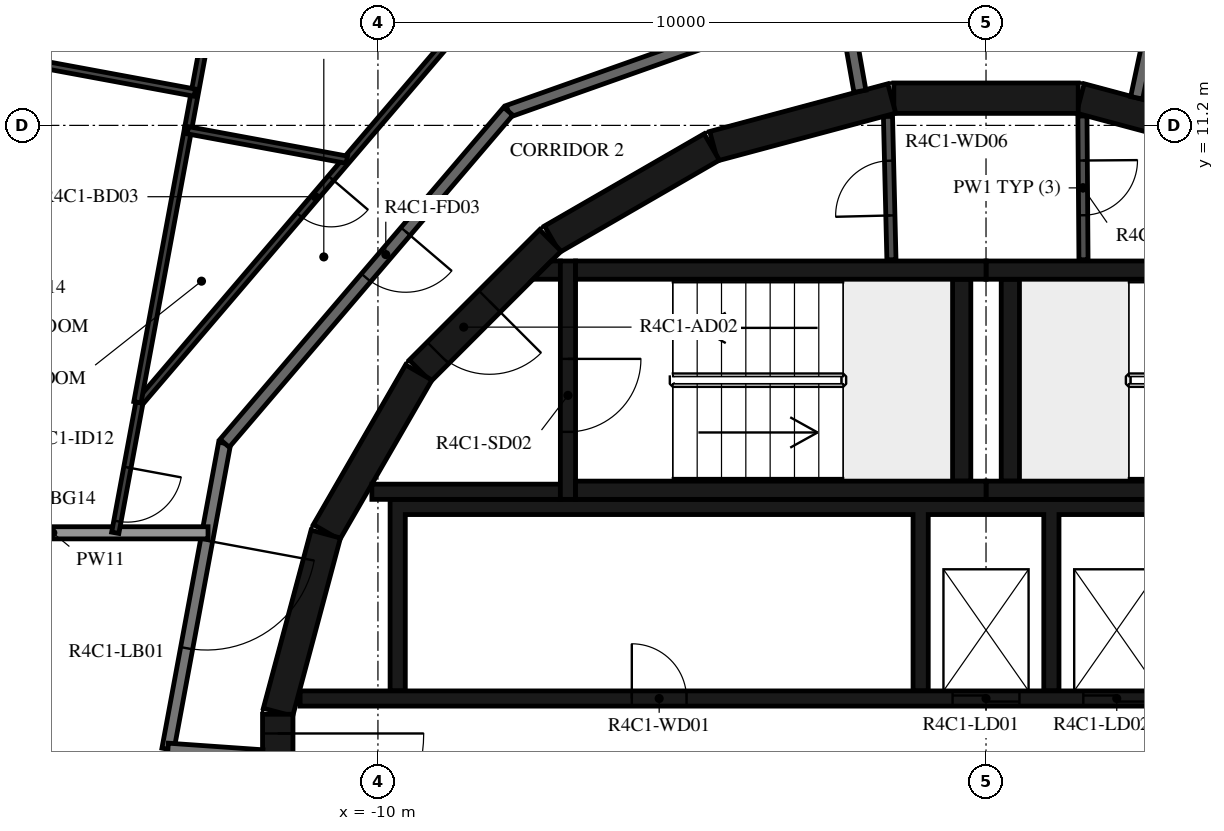
"""IFC4 building model, lengths in metres.
Left out: names, types, materials, properties, quantities, classifications, styles, units other than length and angle.
Written with IfcOpenShell. Run it as: python <this file> out.ifc"""

import sys

from ifc_helpers import new_model, si_unit, direction, frame, frame_2d, origin, place, context, subcontext, project, spatial, polyline, rectangle, outline, extrude, element, fill, save


model = new_model("IFC4")
c1 = context("Model", 3, precision=1e-05, world=origin(), true_north=direction((0.0, 1.0)))
c2 = subcontext(c1, "Body", "Model", "MODEL_VIEW")
j1 = project(units=[si_unit("LENGTHUNIT", "METRE"), si_unit("PLANEANGLEUNIT", "RADIAN")], contexts=[c1])
p1 = place(None, origin())
s1 = spatial("IfcSite", under=j1, at=p1, CompositionType="ELEMENT")
p2 = place(p1, origin())
s2 = spatial("IfcBuilding", under=s1, at=p2, CompositionType="ELEMENT")
p3 = place(p2, frame((0.0, 0.0, 176.2)))
s3 = spatial("IfcBuildingStorey", under=s2, at=p3, CompositionType="ELEMENT", Elevation=176.2)
for number, where, z_axis, x_axis in (
    (1, (4.479, 10.858, 0.0), (0.0, 0.0, 1.0), (-0.966, 0.259, 0.0)),
    (2, (1.516, 11.647, 0.0), (0.0, 0.0, 1.0), (-1.0, 0.0, 0.0)),
    (3, (-1.55, 11.643, 0.0), (0.0, 0.0, 1.0), (-0.966, -0.259, 0.0)),
    (4, (-4.51, 10.845, 0.0), (0.0, 0.0, 1.0), (-0.866, -0.5, 0.0)),
):
    element("IfcWall", number, at=place(p3, frame(where, z_axis=z_axis, x_axis=x_axis)), inside=s3, PredefinedType="SHEAR", context=c2, shape_type="SweptSolid", body=[
        extrude(rectangle(XDim=3.033, YDim=0.5, at=frame_2d((1.516, 0.0))), origin(), (0.0, 0.0, 1.0), 3.12),
    ])
p4 = place(p3, frame((-7.164, 9.308, 0.0), z_axis=(0.0, 0.0, 1.0), x_axis=(-0.707106781187, -0.707106781187, 0.0)))
e5 = element("IfcWall", 5, at=p4, inside=s3, PredefinedType="SHEAR", context=c2, shape_type="SweptSolid", body=[
    extrude(rectangle(XDim=3.032, YDim=0.5, at=frame_2d((1.516, 0.0))), origin(), (0.0, 0.0, 1.0), 3.12),
])
p5 = place(p4, frame((1.416, 0.0, 0.0)))
e6 = element("IfcOpeningElement", 6, at=p5, cuts=e5, PredefinedType="OPENING", context=c2, shape_type="SweptSolid", body=[
    extrude(rectangle(XDim=1.2, YDim=2.1, at=frame_2d((0.6, 1.05))), frame((0.0, 0.26, 0.0), z_axis=(0.0, -1.0, 0.0), x_axis=(1.0, 0.0, 0.0)), (0.0, 0.0, 1.0), 0.52),
])
for number, where, z_axis, x_axis in (
    (7, (-9.329, 7.137, 0.0), (0.0, 0.0, 1.0), (-0.5, -0.866, 0.0)),
    (8, (-10.858, 4.479, 0.0), (0.0, 0.0, 1.0), (-0.259, -0.966, 0.0)),
):
    element("IfcWall", number, at=place(p3, frame(where, z_axis=z_axis, x_axis=x_axis)), inside=s3, PredefinedType="SHEAR", context=c2, shape_type="SweptSolid", body=[
        extrude(rectangle(XDim=3.033, YDim=0.5, at=frame_2d((1.516, 0.0))), origin(), (0.0, 0.0, 1.0), 3.12),
    ])
p6 = place(p3, frame((-11.647, 1.516, 0.0), z_axis=(0.0, 0.0, 1.0), x_axis=(0.0, -1.0, 0.0)))
e9 = element("IfcWall", 9, at=p6, inside=s3, PredefinedType="SHEAR", context=c2, shape_type="SweptSolid", body=[
    extrude(rectangle(XDim=3.033, YDim=0.5, at=frame_2d((1.516, 0.0))), origin(), (0.0, 0.0, 1.0), 3.12),
])
p7 = place(p6, frame((0.316, 0.0, 0.0)))
e10 = element("IfcOpeningElement", 10, at=p7, cuts=e9, PredefinedType="OPENING", context=c2, shape_type="SweptSolid", body=[
    extrude(rectangle(XDim=2.4, YDim=2.1, at=frame_2d((1.2, 1.05))), frame((0.0, 0.26, 0.0), z_axis=(0.0, -1.0, 0.0), x_axis=(1.0, 0.0, 0.0)), (0.0, 0.0, 1.0), 0.52),
])
for number, where, z_axis, x_axis in (
    (11, (0.0, 5.2, 0.0), (0.0, 0.0, 1.0), (1.0, 0.0, 0.0)),
    (12, (0.0, 8.82, 0.0), (0.0, 0.0, 1.0), (1.0, 0.0, 0.0)),
):
    element("IfcWall", number, at=place(p3, frame(where, z_axis=z_axis, x_axis=x_axis)), inside=s3, PredefinedType="SHEAR", context=c2, shape_type="SweptSolid", body=[
        extrude(rectangle(XDim=6.75, YDim=0.3, at=frame_2d((3.375, 0.0))), origin(), (0.0, 0.0, 1.0), 3.12),
    ])
p8 = place(p3, frame((0.4, 5.35, 0.0), z_axis=(0.0, 0.0, 1.0), x_axis=(0.0, 1.0, 0.0)))
e13 = element("IfcWall", 13, at=p8, inside=s3, PredefinedType="SHEAR", context=c2, shape_type="SweptSolid", body=[
    extrude(rectangle(XDim=3.32, YDim=0.3, at=frame_2d((1.66, 0.0))), origin(), (0.0, 0.0, 1.0), 3.12),
])
for number, where, z_axis, x_axis in (
    (14, (-6.75, 5.2, 0.0), (0.0, 0.0, 1.0), (1.0, 0.0, 0.0)),
    (15, (-6.75, 8.82, 0.0), (0.0, 0.0, 1.0), (1.0, 0.0, 0.0)),
):
    element("IfcWall", number, at=place(p3, frame(where, z_axis=z_axis, x_axis=x_axis)), inside=s3, PredefinedType="SHEAR", context=c2, shape_type="SweptSolid", body=[
        extrude(rectangle(XDim=6.75, YDim=0.3, at=frame_2d((3.375, 0.0))), origin(), (0.0, 0.0, 1.0), 3.12),
    ])
p9 = place(p3, frame((-0.4, 5.35, 0.0), z_axis=(0.0, 0.0, 1.0), x_axis=(0.0, 1.0, 0.0)))
e16 = element("IfcWall", 16, at=p9, inside=s3, PredefinedType="SHEAR", context=c2, shape_type="SweptSolid", body=[
    extrude(rectangle(XDim=3.32, YDim=0.3, at=frame_2d((1.66, 0.0))), origin(), (0.0, 0.0, 1.0), 3.12),
])
p10 = place(p3, frame((-6.875, 8.97, 0.0), z_axis=(0.0, 0.0, 1.0), x_axis=(0.0, -1.0, 0.0)))
e17 = element("IfcWall", 17, at=p10, inside=s3, PredefinedType="SHEAR", context=c2, shape_type="SweptSolid", body=[
    extrude(rectangle(XDim=3.92, YDim=0.25, at=frame_2d((1.96, 0.0))), origin(), (0.0, 0.0, 1.0), 3.12),
])
p11 = place(p10, frame((1.61, 0.0, 0.0)))
e18 = element("IfcOpeningElement", 18, at=p11, cuts=e17, PredefinedType="OPENING", context=c2, shape_type="SweptSolid", body=[
    extrude(rectangle(XDim=1.2, YDim=2.1, at=frame_2d((0.6, 1.05))), frame((0.0, 0.135, 0.0), z_axis=(0.0, -1.0, 0.0), x_axis=(1.0, 0.0, 0.0)), (0.0, 0.0, 1.0), 0.27),
])
p12 = place(p3, frame((-7.0, 5.175, 0.0), z_axis=(0.0, 0.0, 1.0), x_axis=(-1.0, 0.0, 0.0)))
e19 = element("IfcWall", 19, at=p12, inside=s3, PredefinedType="SHEAR", context=c2, shape_type="SweptSolid", body=[
    extrude(rectangle(XDim=3.1, YDim=0.25, at=frame_2d((1.55, 0.0))), origin(), (0.0, 0.0, 1.0), 3.12),
])
p13 = place(p3, origin())
e20 = element("IfcWall", 20, at=p13, inside=s3, PredefinedType="SHEAR", context=c2, shape_type="SweptSolid", body=[
    extrude(outline(polyline([(-7.148, 8.97), (-7.0, 8.97), (-7.0, 8.67), (-7.448, 8.67), (-7.148, 8.97)])), origin(), (0.0, 0.0, 1.0), 3.12),
])
p14 = place(p3, origin())
e21 = element("IfcWall", 21, at=p14, inside=s3, PredefinedType="SHEAR", context=c2, shape_type="SweptSolid", body=[
    extrude(outline(polyline([(-9.55, 4.8), (-1.2, 4.8), (-1.2, 1.9), (-0.95, 1.9), (-0.95, 4.8), (0.95, 4.8), (0.95, 1.9), (1.2, 1.9), (1.2, 4.8), (3.1, 4.8), (3.1, 1.9), (3.35, 1.9), (3.35, 4.8), (5.25, 4.8), (5.25, 1.9), (5.5, 1.9), (5.5, 4.8), (7.4, 4.8), (7.4, 1.9), (7.65, 1.9), (7.65, 4.8), (9.55, 4.8), (9.55, 1.9), (9.8, 1.9), (9.8, 4.8), (9.8, 5.05), (-9.8, 5.05), (-9.8, 4.8), (-9.8, 1.9), (-9.55, 1.9), (-9.55, 4.8)])), origin(), (0.0, 0.0, 1.0), 3.12),
])
p15 = place(p3, frame((-11.28, 1.775, 0.0), z_axis=(0.0, 0.0, 1.0), x_axis=(1.0, 0.0, 0.0)))
e22 = element("IfcWall", 22, at=p15, inside=s3, PredefinedType="SHEAR", context=c2, shape_type="SweptSolid", body=[
    extrude(rectangle(XDim=14.38, YDim=0.25, at=frame_2d((7.19, 0.0))), origin(), (0.0, 0.0, 1.0), 3.12),
])
p16 = place(p15, frame((10.73, 0.0, 0.0)))
e23 = element("IfcOpeningElement", 23, at=p16, cuts=e22, PredefinedType="OPENING", context=c2, shape_type="SweptSolid", body=[
    extrude(rectangle(XDim=1.1, YDim=2.1, at=frame_2d((0.55, 1.05))), frame((0.0, 0.135, 0.0), z_axis=(0.0, -1.0, 0.0), x_axis=(1.0, 0.0, 0.0)), (0.0, 0.0, 1.0), 0.27),
])
p17 = place(p15, frame((12.88, 0.0, 0.0)))
e24 = element("IfcOpeningElement", 24, at=p17, cuts=e22, PredefinedType="OPENING", context=c2, shape_type="SweptSolid", body=[
    extrude(rectangle(XDim=1.1, YDim=2.1, at=frame_2d((0.55, 1.05))), frame((0.0, 0.135, 0.0), z_axis=(0.0, -1.0, 0.0), x_axis=(1.0, 0.0, 0.0)), (0.0, 0.0, 1.0), 0.27),
])
p18 = place(p15, frame((5.455, 0.0, 0.0)))
e25 = element("IfcOpeningElement", 25, at=p18, cuts=e22, PredefinedType="OPENING", context=c2, shape_type="SweptSolid", body=[
    extrude(rectangle(XDim=0.9, YDim=2.1, at=frame_2d((0.45, 1.05))), frame((0.0, 0.135, 0.0), z_axis=(0.0, -1.0, 0.0), x_axis=(1.0, 0.0, 0.0)), (0.0, 0.0, 1.0), 0.27),
])
p19 = place(p3, frame((1.586, 11.354, 0.0), z_axis=(0.0, 0.0, 1.0), x_axis=(0.007227482881, -0.999973881405, 0.0)))
e26 = element("IfcWall", 26, at=p19, inside=s3, PredefinedType="PARTITIONING", context=c2, shape_type="SweptSolid", body=[
    extrude(rectangle(XDim=2.365, YDim=0.15, at=frame_2d((1.182, 0.0))), origin(), (0.0, 0.0, 1.0), 3.12),
])
p20 = place(p19, frame((0.732, 0.0, 0.0)))
e27 = element("IfcOpeningElement", 27, at=p20, cuts=e26, PredefinedType="OPENING", context=c2, shape_type="SweptSolid", body=[
    extrude(rectangle(XDim=0.9, YDim=2.1, at=frame_2d((0.45, 1.05))), frame((0.0, 0.085, 0.0), z_axis=(0.0, -1.0, 0.0), x_axis=(1.0, 0.0, 0.0)), (0.0, 0.0, 1.0), 0.17),
])
p21 = place(p3, frame((-1.555, 8.99, 0.0), z_axis=(0.0, 0.0, 1.0), x_axis=(-0.024125549686, 0.999708936567, 0.0)))
e28 = element("IfcWall", 28, at=p21, inside=s3, PredefinedType="PARTITIONING", context=c2, shape_type="SweptSolid", body=[
    extrude(rectangle(XDim=2.358, YDim=0.15, at=frame_2d((1.179, 0.0))), origin(), (0.0, 0.0, 1.0), 3.12),
])
p22 = place(p21, frame((0.729, 0.0, 0.0)))
e29 = element("IfcOpeningElement", 29, at=p22, cuts=e28, PredefinedType="OPENING", context=c2, shape_type="SweptSolid", body=[
    extrude(rectangle(XDim=0.9, YDim=2.1, at=frame_2d((0.45, 1.05))), frame((0.0, 0.085, 0.0), z_axis=(0.0, -1.0, 0.0), x_axis=(1.0, 0.0, 0.0)), (0.0, 0.0, 1.0), 0.17),
])
p23 = place(p3, frame((2.787, 13.112, 0.0), z_axis=(0.0, 0.0, 1.0), x_axis=(-0.207941001029, -0.978141370197, 0.0)))
e30 = element("IfcWall", 30, at=p23, inside=s3, PredefinedType="STANDARD", context=c2, shape_type="SweptSolid", body=[
    extrude(rectangle(XDim=1.491, YDim=0.2, at=frame_2d((0.746, 0.0))), origin(), (0.0, 0.0, 1.0), 3.12),
])
p24 = place(p3, frame((-12.521, 5.972, 0.0), z_axis=(0.0, 0.0, 1.0), x_axis=(-0.182251559718, -0.983251935661, 0.0)))
e31 = element("IfcWall", 31, at=p24, inside=s3, PredefinedType="STANDARD", context=c2, shape_type="SweptSolid", body=[
    extrude(rectangle(XDim=5.117, YDim=0.2, at=frame_2d((2.559, 0.0))), origin(), (0.0, 0.0, 1.0), 3.12),
])
p25 = place(p24, frame((1.627, 0.0, 0.0)))
e32 = element("IfcOpeningElement", 32, at=p25, cuts=e31, PredefinedType="OPENING", context=c2, shape_type="SweptSolid", body=[
    extrude(rectangle(XDim=1.8, YDim=2.1, at=frame_2d((0.9, 1.05))), frame((0.0, 0.11, 0.0), z_axis=(0.0, -1.0, 0.0), x_axis=(1.0, 0.0, 0.0)), (0.0, 0.0, 1.0), 0.22),
])
p26 = place(p3, frame((-13.454, 0.941, 0.0), z_axis=(0.0, 0.0, 1.0), x_axis=(0.99755155062, -0.069934997354, 0.0)))
e33 = element("IfcWall", 33, at=p26, inside=s3, PredefinedType="STANDARD", context=c2, shape_type="SweptSolid", body=[
    extrude(rectangle(XDim=1.561, YDim=0.2, at=frame_2d((0.78, 0.0))), origin(), (0.0, 0.0, 1.0), 3.12),
])
p27 = place(p3, frame((-2.074, 11.761, 0.0), z_axis=(0.0, 0.0, 1.0), x_axis=(-0.1736412798, 0.984808969267, 0.0)))
e34 = element("IfcWall", 34, at=p27, inside=s3, PredefinedType="STANDARD", context=c2, shape_type="SweptSolid", body=[
    extrude(rectangle(XDim=1.644, YDim=0.2, at=frame_2d((0.822, 0.0))), origin(), (0.0, 0.0, 1.0), 3.12),
])
p28 = place(p3, frame((-2.359, 13.38, 0.0), z_axis=(0.0, 0.0, 1.0), x_axis=(-0.942647529236, -0.333789807551, 0.0)))
e35 = element("IfcWall", 35, at=p28, inside=s3, PredefinedType="STANDARD", context=c2, shape_type="SweptSolid", body=[
    extrude(rectangle(XDim=5.833, YDim=0.2, at=frame_2d((2.917, 0.0))), origin(), (0.0, 0.0, 1.0), 3.12),
])
p29 = place(p3, frame((-7.858, 11.433, 0.0), z_axis=(0.0, 0.0, 1.0), x_axis=(-0.649440801937, -0.760412154545, 0.0)))
e36 = element("IfcWall", 36, at=p29, inside=s3, PredefinedType="STANDARD", context=c2, shape_type="SweptSolid", body=[
    extrude(rectangle(XDim=7.181, YDim=0.2, at=frame_2d((3.59, 0.0))), origin(), (0.0, 0.0, 1.0), 3.12),
])
p30 = place(p29, frame((2.6, 0.0, 0.0)))
e37 = element("IfcOpeningElement", 37, at=p30, cuts=e36, PredefinedType="OPENING", context=c2, shape_type="SweptSolid", body=[
    extrude(rectangle(XDim=1.0, YDim=2.1, at=frame_2d((0.5, 1.05))), frame((0.0, 0.11, 0.0), z_axis=(0.0, -1.0, 0.0), x_axis=(1.0, 0.0, 0.0)), (0.0, 0.0, 1.0), 0.22),
])
p31 = place(p3, frame((-12.794, 4.5, 0.0), z_axis=(0.0, 0.0, 1.0), x_axis=(-1.0, 0.0, 0.0)))
e38 = element("IfcWall", 38, at=p31, inside=s3, PredefinedType="STANDARD", context=c2, shape_type="SweptSolid", body=[
    extrude(rectangle(XDim=5.106, YDim=0.2, at=frame_2d((2.553, 0.0))), origin(), (0.0, 0.0, 1.0), 2.73),
])
p32 = place(p3, frame((8.702, 12.206, 0.0), z_axis=(0.0, 0.0, 1.0), x_axis=(-0.760401313718, 0.649453494945, 0.0)))
e39 = element("IfcWall", 39, at=p32, inside=s3, PredefinedType="PARTITIONING", context=c2, shape_type="SweptSolid", body=[
    extrude(rectangle(XDim=16.724, YDim=0.12, at=frame_2d((8.362, 0.0))), origin(), (0.0, 0.0, 1.0), 3.12),
])
p33 = place(p32, frame((0.2, 0.0, 0.0)))
e40 = element("IfcOpeningElement", 40, at=p33, cuts=e39, PredefinedType="OPENING", context=c2, shape_type="SweptSolid", body=[
    extrude(rectangle(XDim=0.9, YDim=2.1, at=frame_2d((0.45, 1.05))), frame((0.0, 0.07, 0.0), z_axis=(0.0, -1.0, 0.0), x_axis=(1.0, 0.0, 0.0)), (0.0, 0.0, 1.0), 0.14),
])
p34 = place(p32, frame((8.02, 0.0, 0.0)))
e41 = element("IfcOpeningElement", 41, at=p34, cuts=e39, PredefinedType="OPENING", context=c2, shape_type="SweptSolid", body=[
    extrude(rectangle(XDim=0.9, YDim=2.1, at=frame_2d((0.45, 1.05))), frame((0.0, 0.07, 0.0), z_axis=(0.0, -1.0, 0.0), x_axis=(1.0, 0.0, 0.0)), (0.0, 0.0, 1.0), 0.14),
])
p35 = place(p32, frame((14.412, 0.0, 0.0)))
e42 = element("IfcOpeningElement", 42, at=p35, cuts=e39, PredefinedType="OPENING", context=c2, shape_type="SweptSolid", body=[
    extrude(rectangle(XDim=0.9, YDim=2.1, at=frame_2d((0.45, 1.05))), frame((0.0, 0.07, 0.0), z_axis=(0.0, -1.0, 0.0), x_axis=(1.0, 0.0, 0.0)), (0.0, 0.0, 1.0), 0.14),
])
p36 = place(p3, frame((-8.774, 12.669, 0.0), z_axis=(0.0, 0.0, 1.0), x_axis=(-0.649446157105, -0.760407580855, 0.0)))
e43 = element("IfcWall", 43, at=p36, inside=s3, PredefinedType="PARTITIONING", context=c2, shape_type="SweptSolid", body=[
    extrude(rectangle(XDim=7.927, YDim=0.12, at=frame_2d((3.964, 0.0))), origin(), (0.0, 0.0, 1.0), 3.12),
])
p37 = place(p36, frame((3.074, 0.0, 0.0)))
e44 = element("IfcOpeningElement", 44, at=p37, cuts=e43, PredefinedType="OPENING", context=c2, shape_type="SweptSolid", body=[
    extrude(rectangle(XDim=0.8, YDim=2.1, at=frame_2d((0.4, 1.05))), frame((0.0, 0.07, 0.0), z_axis=(0.0, -1.0, 0.0), x_axis=(1.0, 0.0, 0.0)), (0.0, 0.0, 1.0), 0.14),
])
p38 = place(p3, frame((-13.923, 6.641, 0.0), z_axis=(0.0, 0.0, 1.0), x_axis=(-0.182209715759, -0.983259690765, 0.0)))
e45 = element("IfcWall", 45, at=p38, inside=s3, PredefinedType="PARTITIONING", context=c2, shape_type="SweptSolid", body=[
    extrude(rectangle(XDim=2.177, YDim=0.12, at=frame_2d((1.089, 0.0))), origin(), (0.0, 0.0, 1.0), 3.12),
])
p39 = place(p38, frame((1.083, 0.0, 0.0)))
e46 = element("IfcOpeningElement", 46, at=p39, cuts=e45, PredefinedType="OPENING", context=c2, shape_type="SweptSolid", body=[
    extrude(rectangle(XDim=0.9, YDim=2.1, at=frame_2d((0.45, 1.05))), frame((0.0, 0.07, 0.0), z_axis=(0.0, -1.0, 0.0), x_axis=(1.0, 0.0, 0.0)), (0.0, 0.0, 1.0), 0.14),
])
p40 = place(p3, frame((-13.955, 6.647, 0.0), z_axis=(0.0, 0.0, 1.0), x_axis=(0.182264522222, 0.983249532896, 0.0)))
e47 = element("IfcWall", 47, at=p40, inside=s3, PredefinedType="PARTITIONING", context=c2, shape_type="SweptSolid", body=[
    extrude(rectangle(XDim=4.589, YDim=0.12, at=frame_2d((2.294, 0.0))), origin(), (0.0, 0.0, 1.0), 3.12),
])
p41 = place(p3, frame((-11.396, 20.453, 0.0), z_axis=(0.0, 0.0, 1.0), x_axis=(-0.182223370439, -0.983257160292, 0.0)))
e48 = element("IfcWall", 48, at=p41, inside=s3, PredefinedType="PARTITIONING", context=c2, shape_type="SweptSolid", body=[
    extrude(rectangle(XDim=9.452, YDim=0.12, at=frame_2d((4.726, 0.0))), origin(), (0.0, 0.0, 1.0), 3.12),
])
p42 = place(p41, frame((3.319, 0.0, 0.0)))
e49 = element("IfcOpeningElement", 49, at=p42, cuts=e48, PredefinedType="OPENING", context=c2, shape_type="SweptSolid", body=[
    extrude(rectangle(XDim=0.9, YDim=2.1, at=frame_2d((0.45, 1.05))), frame((0.0, 0.07, 0.0), z_axis=(0.0, -1.0, 0.0), x_axis=(1.0, 0.0, 0.0)), (0.0, 0.0, 1.0), 0.14),
])
p43 = place(p41, frame((0.2, 0.0, 0.0)))
e50 = element("IfcOpeningElement", 50, at=p43, cuts=e48, PredefinedType="OPENING", context=c2, shape_type="SweptSolid", body=[
    extrude(rectangle(XDim=0.9, YDim=2.1, at=frame_2d((0.45, 1.05))), frame((0.0, 0.07, 0.0), z_axis=(0.0, -1.0, 0.0), x_axis=(1.0, 0.0, 0.0)), (0.0, 0.0, 1.0), 0.14),
])
p44 = place(p3, frame((-13.126, 11.12, 0.0), z_axis=(0.0, 0.0, 1.0), x_axis=(0.983257646361, -0.182220747645, 0.0)))
e51 = element("IfcWall", 51, at=p44, inside=s3, PredefinedType="PARTITIONING", context=c2, shape_type="SweptSolid", body=[
    extrude(rectangle(XDim=2.659, YDim=0.12, at=frame_2d((1.33, 0.0))), origin(), (0.0, 0.0, 1.0), 3.12),
])
p45 = place(p3, frame((-16.552, 12.394, 0.0), z_axis=(0.0, 0.0, 1.0), x_axis=(0.983257712156, -0.182220392618, 0.0)))
e52 = element("IfcWall", 52, at=p45, inside=s3, PredefinedType="PARTITIONING", context=c2, shape_type="SweptSolid", body=[
    extrude(rectangle(XDim=3.6, YDim=0.12, at=frame_2d((1.8, 0.0))), origin(), (0.0, 0.0, 1.0), 2.73),
])
p46 = place(p11, origin())
e53 = element("IfcDoor", 53, at=p46, inside=s3, OperationType="SINGLE_SWING_LEFT", PredefinedType="DOOR", context=c2, shape_type="SweptSolid", body=[
    extrude(rectangle(XDim=1.2, YDim=2.1, at=frame_2d((0.6, 1.05))), frame((0.0, 0.025, 0.0), z_axis=(0.0, -1.0, 0.0), x_axis=(1.0, 0.0, 0.0)), (0.0, 0.0, 1.0), 0.05),
])
fill(e18, e53)
p47 = place(p5, origin())
e54 = element("IfcDoor", 54, at=p47, inside=s3, OperationType="SINGLE_SWING_RIGHT", PredefinedType="DOOR", context=c2, shape_type="SweptSolid", body=[
    extrude(rectangle(XDim=1.2, YDim=2.1, at=frame_2d((0.6, 1.05))), frame((0.0, 0.025, 0.0), z_axis=(0.0, -1.0, 0.0), x_axis=(1.0, 0.0, 0.0)), (0.0, 0.0, 1.0), 0.05),
])
fill(e6, e54)
p48 = place(p7, origin())
e55 = element("IfcDoor", 55, at=p48, inside=s3, OperationType="DOUBLE_DOOR_SINGLE_SWING", PredefinedType="DOOR", context=c2, shape_type="SweptSolid", body=[
    extrude(rectangle(XDim=2.4, YDim=2.1, at=frame_2d((1.2, 1.05))), frame((0.0, 0.025, 0.0), z_axis=(0.0, -1.0, 0.0), x_axis=(1.0, 0.0, 0.0)), (0.0, 0.0, 1.0), 0.05),
])
fill(e10, e55)
p49 = place(p16, origin())
e56 = element("IfcDoor", 56, at=p49, inside=s3, OperationType="DOUBLE_DOOR_SLIDING", PredefinedType="DOOR", context=c2, shape_type="SweptSolid", body=[
    extrude(rectangle(XDim=1.1, YDim=2.1, at=frame_2d((0.55, 1.05))), frame((0.0, 0.025, 0.0), z_axis=(0.0, -1.0, 0.0), x_axis=(1.0, 0.0, 0.0)), (0.0, 0.0, 1.0), 0.05),
])
fill(e23, e56)
p50 = place(p17, origin())
e57 = element("IfcDoor", 57, at=p50, inside=s3, OperationType="DOUBLE_DOOR_SLIDING", PredefinedType="DOOR", context=c2, shape_type="SweptSolid", body=[
    extrude(rectangle(XDim=1.1, YDim=2.1, at=frame_2d((0.55, 1.05))), frame((0.0, 0.025, 0.0), z_axis=(0.0, -1.0, 0.0), x_axis=(1.0, 0.0, 0.0)), (0.0, 0.0, 1.0), 0.05),
])
fill(e24, e57)
p51 = place(p18, origin())
e58 = element("IfcDoor", 58, at=p51, inside=s3, OperationType="SINGLE_SWING_LEFT", PredefinedType="DOOR", context=c2, shape_type="SweptSolid", body=[
    extrude(rectangle(XDim=0.9, YDim=2.1, at=frame_2d((0.45, 1.05))), frame((0.0, 0.025, 0.0), z_axis=(0.0, -1.0, 0.0), x_axis=(1.0, 0.0, 0.0)), (0.0, 0.0, 1.0), 0.05),
])
fill(e25, e58)
p52 = place(p20, origin())
e59 = element("IfcDoor", 59, at=p52, inside=s3, OperationType="SINGLE_SWING_LEFT", PredefinedType="DOOR", context=c2, shape_type="SweptSolid", body=[
    extrude(rectangle(XDim=0.9, YDim=2.1, at=frame_2d((0.45, 1.05))), frame((0.0, 0.025, 0.0), z_axis=(0.0, -1.0, 0.0), x_axis=(1.0, 0.0, 0.0)), (0.0, 0.0, 1.0), 0.05),
])
fill(e27, e59)
p53 = place(p22, origin())
e60 = element("IfcDoor", 60, at=p53, inside=s3, OperationType="SINGLE_SWING_RIGHT", PredefinedType="DOOR", context=c2, shape_type="SweptSolid", body=[
    extrude(rectangle(XDim=0.9, YDim=2.1, at=frame_2d((0.45, 1.05))), frame((0.0, 0.025, 0.0), z_axis=(0.0, -1.0, 0.0), x_axis=(1.0, 0.0, 0.0)), (0.0, 0.0, 1.0), 0.05),
])
fill(e29, e60)
p54 = place(p30, origin())
e61 = element("IfcDoor", 61, at=p54, inside=s3, OperationType="SINGLE_SWING_LEFT", PredefinedType="DOOR", context=c2, shape_type="SweptSolid", body=[
    extrude(rectangle(XDim=1.0, YDim=2.1, at=frame_2d((0.5, 1.05))), frame((0.0, 0.025, 0.0), z_axis=(0.0, -1.0, 0.0), x_axis=(1.0, 0.0, 0.0)), (0.0, 0.0, 1.0), 0.05),
])
fill(e37, e61)
p55 = place(p37, origin())
e62 = element("IfcDoor", 62, at=p55, inside=s3, OperationType="SINGLE_SWING_LEFT", PredefinedType="DOOR", context=c2, shape_type="SweptSolid", body=[
    extrude(rectangle(XDim=0.8, YDim=2.1, at=frame_2d((0.4, 1.05))), frame((0.0, 0.025, 0.0), z_axis=(0.0, -1.0, 0.0), x_axis=(1.0, 0.0, 0.0)), (0.0, 0.0, 1.0), 0.05),
])
fill(e44, e62)
p56 = place(p39, origin())
e63 = element("IfcDoor", 63, at=p56, inside=s3, OperationType="SINGLE_SWING_LEFT", PredefinedType="DOOR", context=c2, shape_type="SweptSolid", body=[
    extrude(rectangle(XDim=0.9, YDim=2.1, at=frame_2d((0.45, 1.05))), frame((0.0, 0.025, 0.0), z_axis=(0.0, -1.0, 0.0), x_axis=(1.0, 0.0, 0.0)), (0.0, 0.0, 1.0), 0.05),
])
fill(e46, e63)
p57 = place(p25, origin())
e64 = element("IfcDoor", 64, at=p57, inside=s3, OperationType="DOUBLE_DOOR_SINGLE_SWING", PredefinedType="DOOR", context=c2, shape_type="SweptSolid", body=[
    extrude(rectangle(XDim=1.8, YDim=2.1, at=frame_2d((0.9, 1.05))), frame((0.0, 0.025, 0.0), z_axis=(0.0, -1.0, 0.0), x_axis=(1.0, 0.0, 0.0)), (0.0, 0.0, 1.0), 0.05),
])
fill(e32, e64)
save(model, sys.argv[1])
